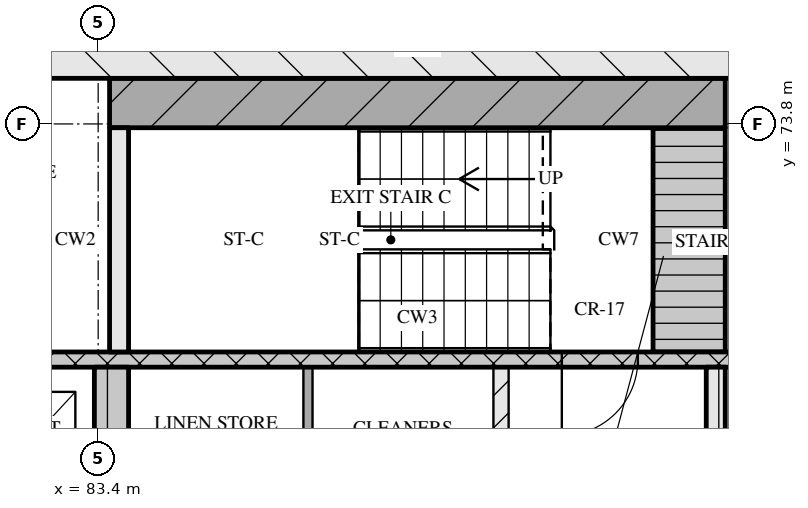
"""IFC4 building model, lengths in metres.
Left out: names, types, materials, properties, quantities, classifications, styles, units other than length and angle.
Written with IfcOpenShell. Run it as: python <this file> out.ifc"""

import sys

from ifc_helpers import new_model, si_unit, direction, frame, frame_2d, origin, place, context, subcontext, project, spatial, rectangle, extrude, element, fill, save


model = new_model("IFC4")
c1 = context("Model", 3, precision=1e-05, world=origin(), true_north=direction((0.0, 1.0)))
c2 = subcontext(c1, "Body", "Model", "MODEL_VIEW")
j1 = project(units=[si_unit("LENGTHUNIT", "METRE"), si_unit("PLANEANGLEUNIT", "RADIAN")], contexts=[c1])
p1 = place(None, origin())
s1 = spatial("IfcSite", under=j1, at=p1, CompositionType="ELEMENT")
p2 = place(p1, origin())
s2 = spatial("IfcBuilding", under=s1, at=p2, CompositionType="ELEMENT")
p3 = place(p2, frame((0.0, 0.0, 116.85)))
s3 = spatial("IfcBuildingStorey", under=s2, at=p3, CompositionType="ELEMENT", Elevation=116.85)
p4 = place(p3, frame((66.8, 74.9, 0.0), z_axis=(0.0, 0.0, 1.0), x_axis=(1.0, 0.0, 0.0)))
e1 = element("IfcWall", 1, at=p4, inside=s3, PredefinedType="SOLIDWALL", context=c2, shape_type="SweptSolid", body=[
    extrude(rectangle(XDim=41.6, YDim=1.0, at=frame_2d((20.8, 0.0))), origin(), (0.0, 0.0, 1.0), 3.32),
])
p5 = place(p3, frame((83.575, 68.0, 0.0), z_axis=(0.0, 0.0, 1.0), x_axis=(0.0, 1.0, 0.0)))
e2 = element("IfcWall", 2, at=p5, inside=s3, PredefinedType="SOLIDWALL", context=c2, shape_type="SweptSolid", body=[
    extrude(rectangle(XDim=2.6, YDim=0.45, at=frame_2d((1.3, 0.0))), origin(), (0.0, 0.0, 1.0), 3.32),
])
p6 = place(p3, frame((86.16, 68.0, 0.0), z_axis=(0.0, 0.0, 1.0), x_axis=(0.0, 1.0, 0.0)))
e3 = element("IfcWall", 3, at=p6, inside=s3, PredefinedType="PARTITIONING", context=c2, shape_type="SweptSolid", body=[
    extrude(rectangle(XDim=2.6, YDim=0.12, at=frame_2d((1.3, 0.0))), origin(), (0.0, 0.0, 1.0), 3.32),
])
p7 = place(p3, frame((88.7, 68.0, 0.0), z_axis=(0.0, 0.0, 1.0), x_axis=(0.0, 1.0, 0.0)))
e4 = element("IfcWall", 4, at=p7, inside=s3, PredefinedType="PARTITIONING", context=c2, shape_type="SweptSolid", body=[
    extrude(rectangle(XDim=2.6, YDim=0.2, at=frame_2d((1.3, 0.0))), origin(), (0.0, 0.0, 1.0), 3.32),
])
p8 = place(p3, frame((91.525, 68.0, 0.0), z_axis=(0.0, 0.0, 1.0), x_axis=(0.0, 1.0, 0.0)))
e5 = element("IfcWall", 5, at=p8, inside=s3, PredefinedType="SOLIDWALL", context=c2, shape_type="SweptSolid", body=[
    extrude(rectangle(XDim=2.6, YDim=0.25, at=frame_2d((1.3, 0.0))), origin(), (0.0, 0.0, 1.0), 3.32),
])
p9 = place(p3, frame((67.8, 70.7, 0.0), z_axis=(0.0, 0.0, 1.0), x_axis=(1.0, 0.0, 0.0)))
e6 = element("IfcWall", 6, at=p9, inside=s3, PredefinedType="SOLIDWALL", context=c2, shape_type="SweptSolid", body=[
    extrude(rectangle(XDim=39.6, YDim=0.2, at=frame_2d((19.8, 0.0))), origin(), (0.0, 0.0, 1.0), 3.32),
])
p10 = place(p9, frame((0.65, 0.0, 0.0)))
e7 = element("IfcOpeningElement", 7, at=p10, cuts=e6, PredefinedType="OPENING", context=c2, shape_type="SweptSolid", body=[
    extrude(rectangle(XDim=1.1, YDim=2.1, at=frame_2d((0.55, 1.05))), frame((0.0, 0.11, 0.0), z_axis=(0.0, -1.0, 0.0), x_axis=(1.0, 0.0, 0.0)), (0.0, 0.0, 1.0), 0.22),
])
p11 = place(p9, frame((3.25, 0.0, 0.0)))
e8 = element("IfcOpeningElement", 8, at=p11, cuts=e6, PredefinedType="OPENING", context=c2, shape_type="SweptSolid", body=[
    extrude(rectangle(XDim=1.1, YDim=2.1, at=frame_2d((0.55, 1.05))), frame((0.0, 0.11, 0.0), z_axis=(0.0, -1.0, 0.0), x_axis=(1.0, 0.0, 0.0)), (0.0, 0.0, 1.0), 0.22),
])
p12 = place(p9, frame((5.9, 0.0, 0.0)))
e9 = element("IfcOpeningElement", 9, at=p12, cuts=e6, PredefinedType="OPENING", context=c2, shape_type="SweptSolid", body=[
    extrude(rectangle(XDim=1.0, YDim=2.1, at=frame_2d((0.5, 1.05))), frame((0.0, 0.11, 0.0), z_axis=(0.0, -1.0, 0.0), x_axis=(1.0, 0.0, 0.0)), (0.0, 0.0, 1.0), 0.22),
])
p13 = place(p9, frame((21.7, 0.0, 0.0)))
e10 = element("IfcOpeningElement", 10, at=p13, cuts=e6, PredefinedType="OPENING", context=c2, shape_type="SweptSolid", body=[
    extrude(rectangle(XDim=1.0, YDim=2.1, at=frame_2d((0.5, 1.05))), frame((0.0, 0.11, 0.0), z_axis=(0.0, -1.0, 0.0), x_axis=(1.0, 0.0, 0.0)), (0.0, 0.0, 1.0), 0.22),
])
p14 = place(p9, frame((32.7, 0.0, 0.0)))
e11 = element("IfcOpeningElement", 11, at=p14, cuts=e6, PredefinedType="OPENING", context=c2, shape_type="SweptSolid", body=[
    extrude(rectangle(XDim=1.0, YDim=2.1, at=frame_2d((0.5, 1.05))), frame((0.0, 0.11, 0.0), z_axis=(0.0, -1.0, 0.0), x_axis=(1.0, 0.0, 0.0)), (0.0, 0.0, 1.0), 0.22),
])
p15 = place(p9, frame((35.25, 0.0, 0.0)))
e12 = element("IfcOpeningElement", 12, at=p15, cuts=e6, PredefinedType="OPENING", context=c2, shape_type="SweptSolid", body=[
    extrude(rectangle(XDim=1.1, YDim=2.1, at=frame_2d((0.55, 1.05))), frame((0.0, 0.11, 0.0), z_axis=(0.0, -1.0, 0.0), x_axis=(1.0, 0.0, 0.0)), (0.0, 0.0, 1.0), 0.22),
])
p16 = place(p9, frame((37.85, 0.0, 0.0)))
e13 = element("IfcOpeningElement", 13, at=p16, cuts=e6, PredefinedType="OPENING", context=c2, shape_type="SweptSolid", body=[
    extrude(rectangle(XDim=1.1, YDim=2.1, at=frame_2d((0.55, 1.05))), frame((0.0, 0.11, 0.0), z_axis=(0.0, -1.0, 0.0), x_axis=(1.0, 0.0, 0.0)), (0.0, 0.0, 1.0), 0.22),
])
p17 = place(p3, frame((83.675, 70.8, 0.0), z_axis=(0.0, 0.0, 1.0), x_axis=(0.0, 1.0, 0.0)))
e14 = element("IfcWall", 14, at=p17, inside=s3, PredefinedType="SOLIDWALL", context=c2, shape_type="SweptSolid", body=[
    extrude(rectangle(XDim=2.95, YDim=0.25, at=frame_2d((1.475, 0.0))), origin(), (0.0, 0.0, 1.0), 3.32),
])
p18 = place(p3, frame((91.175, 70.8, 0.0), z_axis=(0.0, 0.0, 1.0), x_axis=(0.0, 1.0, 0.0)))
e15 = element("IfcWall", 15, at=p18, inside=s3, PredefinedType="SOLIDWALL", context=c2, shape_type="SweptSolid", body=[
    extrude(rectangle(XDim=2.95, YDim=0.95, at=frame_2d((1.475, 0.0))), origin(), (0.0, 0.0, 1.0), 3.32),
])
p19 = place(p3, frame((83.55, 74.075, 0.0), z_axis=(0.0, 0.0, 1.0), x_axis=(1.0, 0.0, 0.0)))
e16 = element("IfcWall", 16, at=p19, inside=s3, PredefinedType="SOLIDWALL", context=c2, shape_type="SweptSolid", body=[
    extrude(rectangle(XDim=8.1, YDim=0.65, at=frame_2d((4.05, 0.0))), origin(), (0.0, 0.0, 1.0), 3.32),
])
p20 = place(p13, origin())
e17 = element("IfcDoor", 17, at=p20, inside=s3, OperationType="SINGLE_SWING_RIGHT", PredefinedType="DOOR", context=c2, shape_type="SweptSolid", body=[
    extrude(rectangle(XDim=1.0, YDim=2.1, at=frame_2d((0.5, 1.05))), frame((0.0, 0.025, 0.0), z_axis=(0.0, -1.0, 0.0), x_axis=(1.0, 0.0, 0.0)), (0.0, 0.0, 1.0), 0.05),
])
fill(e10, e17)
save(model, sys.argv[1])
